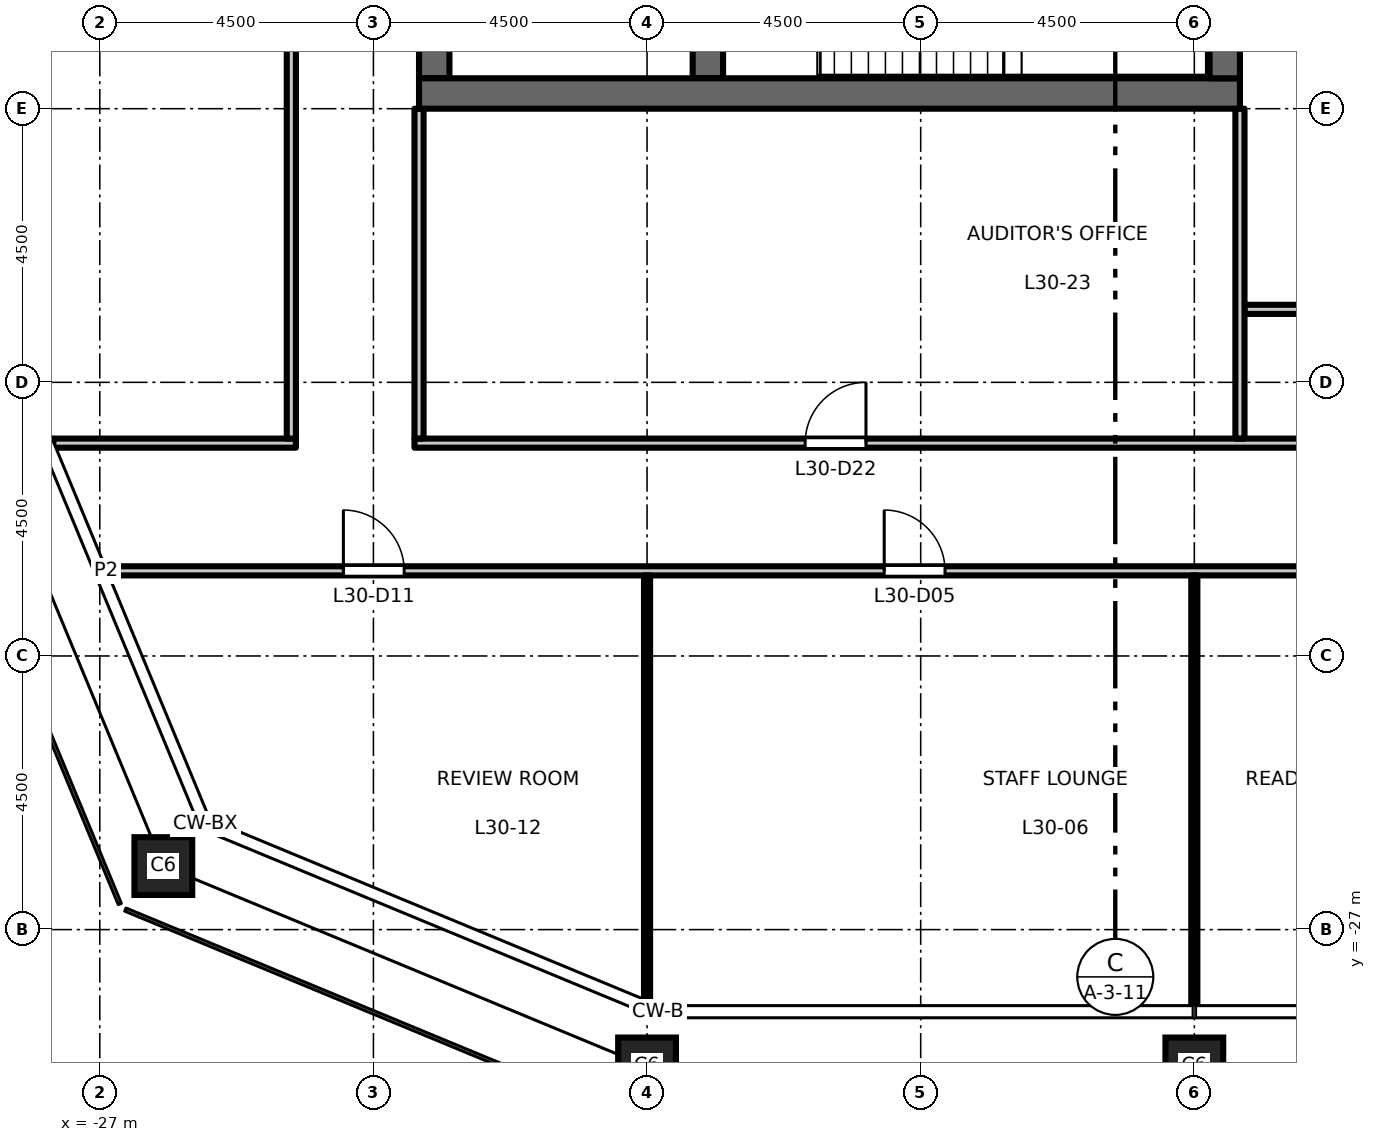
"""IFC4 building model, lengths in metres.
Left out: names, types, materials, properties, quantities, classifications, styles, units other than length and angle.
Written with IfcOpenShell. Run it as: python <this file> out.ifc"""

import sys

from ifc_helpers import new_model, si_unit, direction, frame, frame_2d, origin, origin_2d, place, context, subcontext, project, spatial, rectangle, hollow_rectangle, extrude, element, fill, save


model = new_model("IFC4")
c1 = context("Model", 3, precision=1e-05, world=origin(), true_north=direction((0.0, 1.0)))
c2 = subcontext(c1, "Body", "Model", "MODEL_VIEW")
j1 = project(units=[si_unit("LENGTHUNIT", "METRE"), si_unit("PLANEANGLEUNIT", "RADIAN")], contexts=[c1])
p1 = place(None, origin())
s1 = spatial("IfcSite", under=j1, at=p1, CompositionType="ELEMENT")
p2 = place(p1, origin())
s2 = spatial("IfcBuilding", under=s1, at=p2, CompositionType="ELEMENT")
p3 = place(p2, frame((0.0, 0.0, 140.7)))
s3 = spatial("IfcBuildingStorey", under=s2, at=p3, CompositionType="ELEMENT", Elevation=140.7)
for number, where, z_axis, x_axis in (
    (1, (-18.0, -29.25, 0.0), (0.0, 0.0, 1.0), (1.0, 0.0, 0.0)),
    (2, (-9.0, -29.25, 0.0), (0.0, 0.0, 1.0), (1.0, 0.0, 0.0)),
    (3, (-25.955, -25.955, 0.0), (0.0, 0.0, 1.0), (1.0, 0.0, 0.0)),
):
    element("IfcColumn", number, at=place(p3, frame(where, z_axis=z_axis, x_axis=x_axis)), inside=s3, PredefinedType="COLUMN", context=c2, shape_type="SweptSolid", body=[
        extrude(hollow_rectangle(XDim=0.95, YDim=0.95, WallThickness=0.055, at=origin_2d()), origin(), (0.0, 0.0, 1.0), 4.5),
    ])
p4 = place(p3, frame((-21.5, -13.0, 0.0), z_axis=(0.0, 0.0, 1.0), x_axis=(0.0, 1.0, 0.0)))
e4 = element("IfcWall", 4, at=p4, inside=s3, PredefinedType="SHEAR", context=c2, shape_type="SweptSolid", body=[
    extrude(rectangle(XDim=26.0, YDim=0.5, at=frame_2d((13.0, 0.0))), origin(), (0.0, 0.0, 1.0), 4.35),
])
p5 = place(p4, frame((16.825, 0.0, 0.0)))
e5 = element("IfcOpeningElement", 5, at=p5, cuts=e4, PredefinedType="OPENING", context=c2, shape_type="SweptSolid", body=[
    extrude(rectangle(XDim=1.8, YDim=2.1, at=frame_2d((0.9, 1.05))), frame((0.0, 0.26, 0.0), z_axis=(0.0, -1.0, 0.0), x_axis=(1.0, 0.0, 0.0)), (0.0, 0.0, 1.0), 0.52),
])
p6 = place(p4, frame((7.375, 0.0, 0.0)))
e6 = element("IfcOpeningElement", 6, at=p6, cuts=e4, PredefinedType="OPENING", context=c2, shape_type="SweptSolid", body=[
    extrude(rectangle(XDim=1.8, YDim=2.1, at=frame_2d((0.9, 1.05))), frame((0.0, 0.26, 0.0), z_axis=(0.0, -1.0, 0.0), x_axis=(1.0, 0.0, 0.0)), (0.0, 0.0, 1.0), 0.52),
])
p7 = place(p4, frame((23.4, 0.0, 0.0)))
e7 = element("IfcOpeningElement", 7, at=p7, cuts=e4, PredefinedType="OPENING", context=c2, shape_type="SweptSolid", body=[
    extrude(rectangle(XDim=0.9, YDim=2.1, at=frame_2d((0.45, 1.05))), frame((0.0, 0.26, 0.0), z_axis=(0.0, -1.0, 0.0), x_axis=(1.0, 0.0, 0.0)), (0.0, 0.0, 1.0), 0.52),
])
p8 = place(p3, frame((-17.0, -13.0, 0.0), z_axis=(0.0, 0.0, 1.0), x_axis=(0.0, 1.0, 0.0)))
e8 = element("IfcWall", 8, at=p8, inside=s3, PredefinedType="SHEAR", context=c2, shape_type="SweptSolid", body=[
    extrude(rectangle(XDim=6.575, YDim=0.5, at=frame_2d((3.288, 0.0))), origin(), (0.0, 0.0, 1.0), 4.35),
])
p9 = place(p3, frame((-8.25, -13.25, 0.0), z_axis=(0.0, 0.0, 1.0), x_axis=(-1.0, 0.0, 0.0)))
e9 = element("IfcWall", 9, at=p9, inside=s3, PredefinedType="SHEAR", context=c2, shape_type="SweptSolid", body=[
    extrude(rectangle(XDim=13.5, YDim=0.5, at=frame_2d((6.75, 0.0))), origin(), (0.0, 0.0, 1.0), 4.35),
])
p10 = place(p3, frame((-8.5, -13.0, 0.0), z_axis=(0.0, 0.0, 1.0), x_axis=(0.0, 1.0, 0.0)))
e10 = element("IfcWall", 10, at=p10, inside=s3, PredefinedType="SHEAR", context=c2, shape_type="SweptSolid", body=[
    extrude(rectangle(XDim=26.0, YDim=0.5, at=frame_2d((13.0, 0.0))), origin(), (0.0, 0.0, 1.0), 4.35),
])
p11 = place(p3, frame((-26.894, -21.1, 0.0), z_axis=(0.0, 0.0, 1.0), x_axis=(1.0, 0.0, 0.0)))
e11 = element("IfcWall", 11, at=p11, inside=s3, PredefinedType="PARTITIONING", context=c2, shape_type="SweptSolid", body=[
    extrude(rectangle(XDim=53.788, YDim=0.15, at=frame_2d((26.894, 0.0))), origin(), (0.0, 0.0, 1.0), 4.35),
])
p12 = place(p11, frame((12.794, 0.0, 0.0)))
e12 = element("IfcOpeningElement", 12, at=p12, cuts=e11, PredefinedType="OPENING", context=c2, shape_type="SweptSolid", body=[
    extrude(rectangle(XDim=1.0, YDim=2.1, at=frame_2d((0.5, 1.05))), frame((0.0, 0.085, 0.0), z_axis=(0.0, -1.0, 0.0), x_axis=(1.0, 0.0, 0.0)), (0.0, 0.0, 1.0), 0.17),
])
p13 = place(p11, frame((21.794, 0.0, 0.0)))
e13 = element("IfcOpeningElement", 13, at=p13, cuts=e11, PredefinedType="OPENING", context=c2, shape_type="SweptSolid", body=[
    extrude(rectangle(XDim=1.0, YDim=2.1, at=frame_2d((0.5, 1.05))), frame((0.0, 0.085, 0.0), z_axis=(0.0, -1.0, 0.0), x_axis=(1.0, 0.0, 0.0)), (0.0, 0.0, 1.0), 0.17),
])
p14 = place(p11, frame((30.794, 0.0, 0.0)))
e14 = element("IfcOpeningElement", 14, at=p14, cuts=e11, PredefinedType="OPENING", context=c2, shape_type="SweptSolid", body=[
    extrude(rectangle(XDim=1.0, YDim=2.1, at=frame_2d((0.5, 1.05))), frame((0.0, 0.085, 0.0), z_axis=(0.0, -1.0, 0.0), x_axis=(1.0, 0.0, 0.0)), (0.0, 0.0, 1.0), 0.17),
])
p15 = place(p11, frame((39.794, 0.0, 0.0)))
e15 = element("IfcOpeningElement", 15, at=p15, cuts=e11, PredefinedType="OPENING", context=c2, shape_type="SweptSolid", body=[
    extrude(rectangle(XDim=1.0, YDim=2.1, at=frame_2d((0.5, 1.05))), frame((0.0, 0.085, 0.0), z_axis=(0.0, -1.0, 0.0), x_axis=(1.0, 0.0, 0.0)), (0.0, 0.0, 1.0), 0.17),
])
p16 = place(p11, frame((3.9, 0.0, 0.0)))
e16 = element("IfcOpeningElement", 16, at=p16, cuts=e11, PredefinedType="OPENING", context=c2, shape_type="SweptSolid", body=[
    extrude(rectangle(XDim=1.0, YDim=2.1, at=frame_2d((0.5, 1.05))), frame((0.0, 0.085, 0.0), z_axis=(0.0, -1.0, 0.0), x_axis=(1.0, 0.0, 0.0)), (0.0, 0.0, 1.0), 0.17),
])
p17 = place(p11, frame((48.794, 0.0, 0.0)))
e17 = element("IfcOpeningElement", 17, at=p17, cuts=e11, PredefinedType="OPENING", context=c2, shape_type="SweptSolid", body=[
    extrude(rectangle(XDim=1.0, YDim=2.1, at=frame_2d((0.5, 1.05))), frame((0.0, 0.085, 0.0), z_axis=(0.0, -1.0, 0.0), x_axis=(1.0, 0.0, 0.0)), (0.0, 0.0, 1.0), 0.17),
])
p18 = place(p3, frame((-27.764, -19.0, 0.0), z_axis=(0.0, 0.0, 1.0), x_axis=(1.0, 0.0, 0.0)))
e18 = element("IfcWall", 18, at=p18, inside=s3, PredefinedType="PARTITIONING", context=c2, shape_type="SweptSolid", body=[
    extrude(rectangle(XDim=3.989, YDim=0.15, at=frame_2d((1.995, 0.0))), origin(), (0.0, 0.0, 1.0), 4.35),
])
p19 = place(p3, frame((-21.825, -19.0, 0.0), z_axis=(0.0, 0.0, 1.0), x_axis=(1.0, 0.0, 0.0)))
e19 = element("IfcWall", 19, at=p19, inside=s3, PredefinedType="PARTITIONING", context=c2, shape_type="SweptSolid", body=[
    extrude(rectangle(XDim=43.65, YDim=0.15, at=frame_2d((21.825, 0.0))), origin(), (0.0, 0.0, 1.0), 4.35),
])
p20 = place(p19, frame((21.425, 0.0, 0.0)))
e20 = element("IfcOpeningElement", 20, at=p20, cuts=e19, PredefinedType="OPENING", context=c2, shape_type="SweptSolid", body=[
    extrude(rectangle(XDim=1.0, YDim=2.1, at=frame_2d((0.5, 1.05))), frame((0.0, 0.085, 0.0), z_axis=(0.0, -1.0, 0.0), x_axis=(1.0, 0.0, 0.0)), (0.0, 0.0, 1.0), 0.17),
])
p21 = place(p19, frame((6.425, 0.0, 0.0)))
e21 = element("IfcOpeningElement", 21, at=p21, cuts=e19, PredefinedType="OPENING", context=c2, shape_type="SweptSolid", body=[
    extrude(rectangle(XDim=1.0, YDim=2.1, at=frame_2d((0.5, 1.05))), frame((0.0, 0.085, 0.0), z_axis=(0.0, -1.0, 0.0), x_axis=(1.0, 0.0, 0.0)), (0.0, 0.0, 1.0), 0.17),
])
p22 = place(p19, frame((36.425, 0.0, 0.0)))
e22 = element("IfcOpeningElement", 22, at=p22, cuts=e19, PredefinedType="OPENING", context=c2, shape_type="SweptSolid", body=[
    extrude(rectangle(XDim=1.0, YDim=2.1, at=frame_2d((0.5, 1.05))), frame((0.0, 0.085, 0.0), z_axis=(0.0, -1.0, 0.0), x_axis=(1.0, 0.0, 0.0)), (0.0, 0.0, 1.0), 0.17),
])
p23 = place(p3, frame((-8.175, -16.8, 0.0), z_axis=(0.0, 0.0, 1.0), x_axis=(1.0, 0.0, 0.0)))
e23 = element("IfcWall", 23, at=p23, inside=s3, PredefinedType="PARTITIONING", context=c2, shape_type="SweptSolid", body=[
    extrude(rectangle(XDim=14.835, YDim=0.15, at=frame_2d((7.417, 0.0))), origin(), (0.0, 0.0, 1.0), 4.35),
])
p24 = place(p23, frame((2.525, 0.0, 0.0)))
e24 = element("IfcOpeningElement", 24, at=p24, cuts=e23, PredefinedType="OPENING", context=c2, shape_type="SweptSolid", body=[
    extrude(rectangle(XDim=1.0, YDim=2.1, at=frame_2d((0.5, 1.05))), frame((0.0, 0.085, 0.0), z_axis=(0.0, -1.0, 0.0), x_axis=(1.0, 0.0, 0.0)), (0.0, 0.0, 1.0), 0.17),
])
p25 = place(p23, frame((8.775, 0.0, 0.0)))
e25 = element("IfcOpeningElement", 25, at=p25, cuts=e23, PredefinedType="OPENING", context=c2, shape_type="SweptSolid", body=[
    extrude(rectangle(XDim=1.0, YDim=2.1, at=frame_2d((0.5, 1.05))), frame((0.0, 0.085, 0.0), z_axis=(0.0, -1.0, 0.0), x_axis=(1.0, 0.0, 0.0)), (0.0, 0.0, 1.0), 0.17),
])
p26 = place(p23, frame((12.935, 0.0, 0.0)))
e26 = element("IfcOpeningElement", 26, at=p26, cuts=e23, PredefinedType="OPENING", context=c2, shape_type="SweptSolid", body=[
    extrude(rectangle(XDim=1.0, YDim=2.1, at=frame_2d((0.5, 1.05))), frame((0.0, 0.085, 0.0), z_axis=(0.0, -1.0, 0.0), x_axis=(1.0, 0.0, 0.0)), (0.0, 0.0, 1.0), 0.17),
])
p27 = place(p3, frame((-23.85, -18.925, 0.0), z_axis=(0.0, 0.0, 1.0), x_axis=(0.0, 1.0, 0.0)))
e27 = element("IfcWall", 27, at=p27, inside=s3, PredefinedType="PARTITIONING", context=c2, shape_type="SweptSolid", body=[
    extrude(rectangle(XDim=37.85, YDim=0.15, at=frame_2d((18.925, 0.0))), origin(), (0.0, 0.0, 1.0), 4.35),
])
p28 = place(p27, frame((18.525, 0.0, 0.0)))
e28 = element("IfcOpeningElement", 28, at=p28, cuts=e27, PredefinedType="OPENING", context=c2, shape_type="SweptSolid", body=[
    extrude(rectangle(XDim=1.0, YDim=2.1, at=frame_2d((0.5, 1.05))), frame((0.0, 0.085, 0.0), z_axis=(0.0, -1.0, 0.0), x_axis=(1.0, 0.0, 0.0)), (0.0, 0.0, 1.0), 0.17),
])
p29 = place(p3, frame((-21.75, -18.925, 0.0), z_axis=(0.0, 0.0, 1.0), x_axis=(0.0, 1.0, 0.0)))
e29 = element("IfcWall", 29, at=p29, inside=s3, PredefinedType="PARTITIONING", context=c2, shape_type="SweptSolid", body=[
    extrude(rectangle(XDim=5.425, YDim=0.15, at=frame_2d((2.712, 0.0))), origin(), (0.0, 0.0, 1.0), 4.35),
])
p30 = place(p3, frame((-18.0, -28.178, 0.0), z_axis=(0.0, 0.0, 1.0), x_axis=(0.0, 1.0, 0.0)))
e30 = element("IfcWall", 30, at=p30, inside=s3, PredefinedType="PARTITIONING", context=c2, shape_type="SweptSolid", body=[
    extrude(rectangle(XDim=7.003, YDim=0.1, at=frame_2d((3.501, 0.0))), origin(), (0.0, 0.0, 1.0), 3.45),
])
p31 = place(p3, frame((-9.0, -28.26, 0.0), z_axis=(0.0, 0.0, 1.0), x_axis=(0.0, 1.0, 0.0)))
e31 = element("IfcWall", 31, at=p31, inside=s3, PredefinedType="PARTITIONING", context=c2, shape_type="SweptSolid", body=[
    extrude(rectangle(XDim=7.085, YDim=0.1, at=frame_2d((3.542, 0.0))), origin(), (0.0, 0.0, 1.0), 3.45),
])
p32 = place(p3, frame((-8.25, -18.925, 0.0), z_axis=(0.0, 0.0, 1.0), x_axis=(0.0, 1.0, 0.0)))
e32 = element("IfcWall", 32, at=p32, inside=s3, PredefinedType="PARTITIONING", context=c2, shape_type="SweptSolid", body=[
    extrude(rectangle(XDim=5.425, YDim=0.15, at=frame_2d((2.712, 0.0))), origin(), (0.0, 0.0, 1.0), 4.35),
])
p33 = place(p12, origin())
e33 = element("IfcDoor", 33, at=p33, inside=s3, OperationType="SINGLE_SWING_LEFT", PredefinedType="DOOR", context=c2, shape_type="SweptSolid", body=[
    extrude(rectangle(XDim=1.0, YDim=2.1, at=frame_2d((0.5, 1.05))), frame((0.0, 0.025, 0.0), z_axis=(0.0, -1.0, 0.0), x_axis=(1.0, 0.0, 0.0)), (0.0, 0.0, 1.0), 0.05),
])
fill(e12, e33)
p34 = place(p16, origin())
e34 = element("IfcDoor", 34, at=p34, inside=s3, OperationType="SINGLE_SWING_LEFT", PredefinedType="DOOR", context=c2, shape_type="SweptSolid", body=[
    extrude(rectangle(XDim=1.0, YDim=2.1, at=frame_2d((0.5, 1.05))), frame((0.0, 0.025, 0.0), z_axis=(0.0, -1.0, 0.0), x_axis=(1.0, 0.0, 0.0)), (0.0, 0.0, 1.0), 0.05),
])
fill(e16, e34)
p35 = place(p21, origin())
e35 = element("IfcDoor", 35, at=p35, inside=s3, OperationType="SINGLE_SWING_RIGHT", PredefinedType="DOOR", context=c2, shape_type="SweptSolid", body=[
    extrude(rectangle(XDim=1.0, YDim=2.1, at=frame_2d((0.5, 1.05))), frame((0.0, 0.025, 0.0), z_axis=(0.0, -1.0, 0.0), x_axis=(1.0, 0.0, 0.0)), (0.0, 0.0, 1.0), 0.05),
])
fill(e21, e35)
save(model, sys.argv[1])
